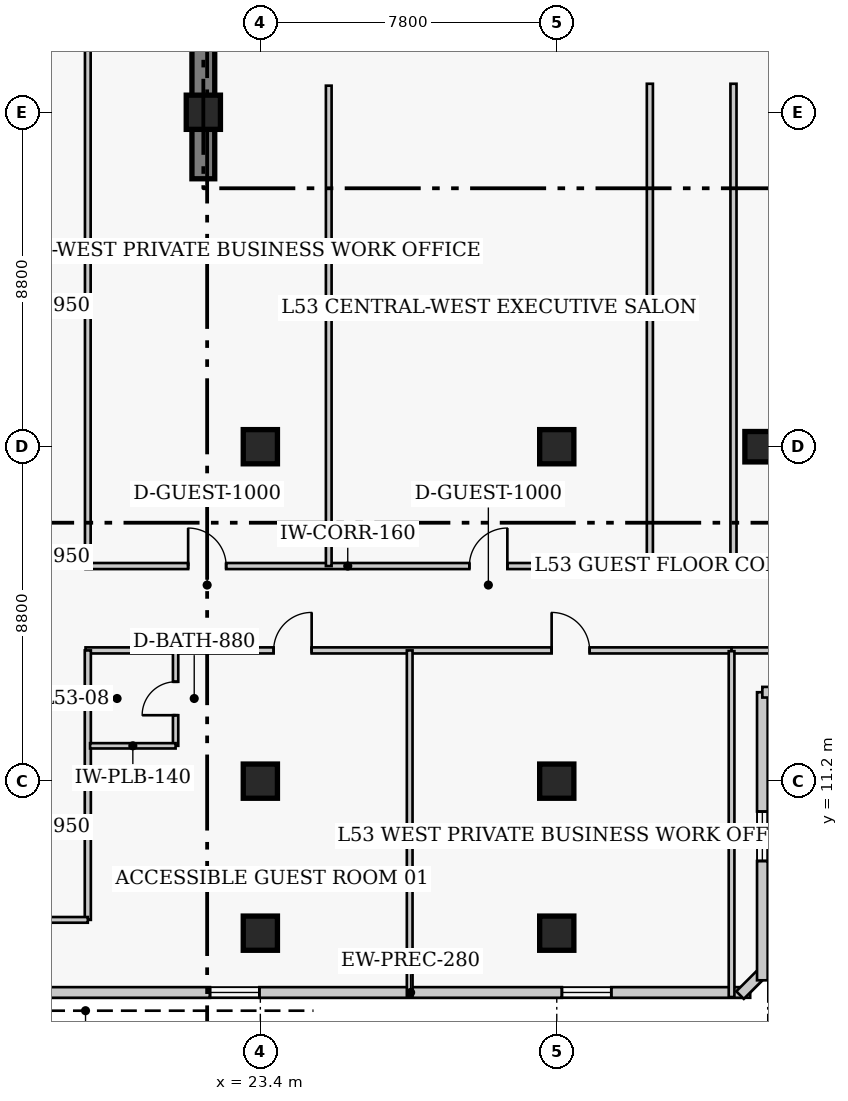
"""IFC4 building model, lengths in metres.
Left out: names, types, materials, properties, quantities, classifications, styles, units other than length and angle.
Written with IfcOpenShell. Run it as: python <this file> out.ifc"""

import sys

from ifc_helpers import new_model, si_unit, direction, frame, frame_2d, origin, origin_2d, place, context, subcontext, project, spatial, rectangle, extrude, element, fill, save


model = new_model("IFC4")
c1 = context("Model", 3, precision=1e-05, world=origin(), true_north=direction((0.0, 1.0)))
c2 = subcontext(c1, "Body", "Model", "MODEL_VIEW")
j1 = project(units=[si_unit("LENGTHUNIT", "METRE"), si_unit("PLANEANGLEUNIT", "RADIAN")], contexts=[c1])
p1 = place(None, origin())
s1 = spatial("IfcSite", under=j1, at=p1, CompositionType="ELEMENT")
p2 = place(p1, origin())
s2 = spatial("IfcBuilding", under=s1, at=p2, CompositionType="ELEMENT")
p3 = place(p2, frame((0.0, 0.0, 212.4)))
s3 = spatial("IfcBuildingStorey", under=s2, at=p3, CompositionType="ELEMENT", Elevation=212.4)
p4 = place(p3, frame((21.9, 27.05, 0.0), z_axis=(0.0, 0.0, 1.0), x_axis=(0.0, 1.0, 0.0)))
e1 = element("IfcWall", 1, at=p4, inside=s3, PredefinedType="SHEAR", context=c2, shape_type="SweptSolid", body=[
    extrude(rectangle(XDim=13.57, YDim=0.6, at=frame_2d((6.785, 0.0))), origin(), (0.0, 0.0, 1.0), 3.9),
])
for number, where, z_axis, x_axis in (
    (2, (23.4, 11.2, 0.0), (0.0, 0.0, 1.0), (1.0, 0.0, 0.0)),
    (3, (23.4, 20.0, 0.0), (0.0, 0.0, 1.0), (1.0, 0.0, 0.0)),
    (4, (31.2, 11.2, 0.0), (0.0, 0.0, 1.0), (1.0, 0.0, 0.0)),
    (5, (31.2, 20.0, 0.0), (0.0, 0.0, 1.0), (1.0, 0.0, 0.0)),
):
    element("IfcColumn", number, at=place(p3, frame(where, z_axis=z_axis, x_axis=x_axis)), inside=s3, PredefinedType="COLUMN", context=c2, shape_type="SweptSolid", body=[
        extrude(rectangle(XDim=0.9, YDim=0.9, at=origin_2d()), origin(), (0.0, 0.0, 1.0), 3.9),
    ])
p5 = place(p3, frame((36.75, 20.0, 0.0), z_axis=(0.0, 0.0, 1.0), x_axis=(1.0, 0.0, 0.0)))
e6 = element("IfcColumn", 6, at=p5, inside=s3, PredefinedType="COLUMN", context=c2, shape_type="SweptSolid", body=[
    extrude(rectangle(XDim=1.2, YDim=0.8, at=origin_2d()), origin(), (0.0, 0.0, 1.0), 3.9),
])
for number, where, z_axis, x_axis in (
    (7, (21.9, 28.8, 0.0), (0.0, 0.0, 1.0), (1.0, 0.0, 0.0)),
    (8, (23.4, 7.2, 0.0), (0.0, 0.0, 1.0), (1.0, 0.0, 0.0)),
    (9, (31.2, 7.2, 0.0), (0.0, 0.0, 1.0), (1.0, 0.0, 0.0)),
):
    element("IfcColumn", number, at=place(p3, frame(where, z_axis=z_axis, x_axis=x_axis)), inside=s3, PredefinedType="COLUMN", context=c2, shape_type="SweptSolid", body=[
        extrude(rectangle(XDim=0.9, YDim=0.9, at=origin_2d()), origin(), (0.0, 0.0, 1.0), 3.9),
    ])
p6 = place(p3, frame((10.46, 5.64, 0.0), z_axis=(0.0, 0.0, 1.0), x_axis=(1.0, 0.0, 0.0)))
e10 = element("IfcWall", 10, at=p6, inside=s3, PredefinedType="SOLIDWALL", context=c2, shape_type="SweptSolid", body=[
    extrude(rectangle(XDim=25.83, YDim=0.28, at=frame_2d((12.915, 0.0))), origin(), (0.0, 0.0, 1.0), 3.65),
])
p7 = place(p6, frame((4.305, 0.0, 0.85)))
e11 = element("IfcOpeningElement", 11, at=p7, cuts=e10, PredefinedType="OPENING", context=c2, shape_type="SweptSolid", body=[
    extrude(rectangle(XDim=1.3, YDim=1.7, at=frame_2d((0.65, 0.85))), frame((0.0, 0.15, 0.0), z_axis=(0.0, -1.0, 0.0), x_axis=(1.0, 0.0, 0.0)), (0.0, 0.0, 1.0), 0.3),
])
p8 = place(p6, frame((11.615, 0.0, 0.85)))
e12 = element("IfcOpeningElement", 12, at=p8, cuts=e10, PredefinedType="OPENING", context=c2, shape_type="SweptSolid", body=[
    extrude(rectangle(XDim=1.3, YDim=1.7, at=frame_2d((0.65, 0.85))), frame((0.0, 0.15, 0.0), z_axis=(0.0, -1.0, 0.0), x_axis=(1.0, 0.0, 0.0)), (0.0, 0.0, 1.0), 0.3),
])
p9 = place(p6, frame((20.875, 0.0, 0.85)))
e13 = element("IfcOpeningElement", 13, at=p9, cuts=e10, PredefinedType="OPENING", context=c2, shape_type="SweptSolid", body=[
    extrude(rectangle(XDim=1.3, YDim=1.7, at=frame_2d((0.65, 0.85))), frame((0.0, 0.15, 0.0), z_axis=(0.0, -1.0, 0.0), x_axis=(1.0, 0.0, 0.0)), (0.0, 0.0, 1.0), 0.3),
])
p10 = place(p3, frame((36.023, 5.571, 0.0), z_axis=(0.0, 0.0, 1.0), x_axis=(0.707106781187, 0.707106781187, 0.0)))
e14 = element("IfcWall", 14, at=p10, inside=s3, PredefinedType="SOLIDWALL", context=c2, shape_type="SweptSolid", body=[
    extrude(rectangle(XDim=0.928, YDim=0.28, at=frame_2d((0.464, 0.0))), origin(), (0.0, 0.0, 1.0), 3.65),
])
p11 = place(p3, frame((36.61, 5.96, 0.0), z_axis=(0.0, 0.0, 1.0), x_axis=(0.0, 1.0, 0.0)))
e15 = element("IfcWall", 15, at=p11, inside=s3, PredefinedType="SOLIDWALL", context=c2, shape_type="SweptSolid", body=[
    extrude(rectangle(XDim=7.58, YDim=0.28, at=frame_2d((3.79, 0.0))), origin(), (0.0, 0.0, 1.0), 3.65),
])
p12 = place(p11, frame((3.14, 0.0, 0.85)))
e16 = element("IfcOpeningElement", 16, at=p12, cuts=e15, PredefinedType="OPENING", context=c2, shape_type="SweptSolid", body=[
    extrude(rectangle(XDim=1.3, YDim=1.7, at=frame_2d((0.65, 0.85))), frame((0.0, 0.15, 0.0), z_axis=(0.0, -1.0, 0.0), x_axis=(1.0, 0.0, 0.0)), (0.0, 0.0, 1.0), 0.3),
])
p13 = place(p3, frame((36.61, 13.54, 0.0), z_axis=(0.0, 0.0, 1.0), x_axis=(1.0, 0.0, 0.0)))
e17 = element("IfcWall", 17, at=p13, inside=s3, PredefinedType="SOLIDWALL", context=c2, shape_type="SweptSolid", body=[
    extrude(rectangle(XDim=4.78, YDim=0.28, at=frame_2d((2.39, 0.0))), origin(), (0.0, 0.0, 1.0), 3.65),
])
p14 = place(p13, frame((1.74, 0.0, 0.85)))
e18 = element("IfcOpeningElement", 18, at=p14, cuts=e17, PredefinedType="OPENING", context=c2, shape_type="SweptSolid", body=[
    extrude(rectangle(XDim=1.3, YDim=1.7, at=frame_2d((0.65, 0.85))), frame((0.0, 0.15, 0.0), z_axis=(0.0, -1.0, 0.0), x_axis=(1.0, 0.0, 0.0)), (0.0, 0.0, 1.0), 0.3),
])
p15 = place(p3, frame((18.8, 16.86, 0.0), z_axis=(0.0, 0.0, 1.0), x_axis=(1.0, 0.0, 0.0)))
e19 = element("IfcWall", 19, at=p15, inside=s3, PredefinedType="PARTITIONING", context=c2, shape_type="SweptSolid", body=[
    extrude(rectangle(XDim=14.85, YDim=0.16, at=frame_2d((7.425, 0.0))), origin(), (0.0, 0.0, 1.0), 3.65),
])
p16 = place(p15, frame((2.7, 0.0, 0.0)))
e20 = element("IfcOpeningElement", 20, at=p16, cuts=e19, PredefinedType="OPENING", context=c2, shape_type="SweptSolid", body=[
    extrude(rectangle(XDim=1.0, YDim=2.15, at=frame_2d((0.5, 1.075))), frame((0.0, 0.09, 0.0), z_axis=(0.0, -1.0, 0.0), x_axis=(1.0, 0.0, 0.0)), (0.0, 0.0, 1.0), 0.18),
])
p17 = place(p15, frame((10.1, 0.0, 0.0)))
e21 = element("IfcOpeningElement", 21, at=p17, cuts=e19, PredefinedType="OPENING", context=c2, shape_type="SweptSolid", body=[
    extrude(rectangle(XDim=1.0, YDim=2.15, at=frame_2d((0.5, 1.075))), frame((0.0, 0.09, 0.0), z_axis=(0.0, -1.0, 0.0), x_axis=(1.0, 0.0, 0.0)), (0.0, 0.0, 1.0), 0.18),
])
p18 = place(p3, frame((35.85, 16.86, 0.0), z_axis=(0.0, 0.0, 1.0), x_axis=(1.0, 0.0, 0.0)))
e22 = element("IfcWall", 22, at=p18, inside=s3, PredefinedType="PARTITIONING", context=c2, shape_type="SweptSolid", body=[
    extrude(rectangle(XDim=22.8, YDim=0.16, at=frame_2d((11.4, 0.0))), origin(), (0.0, 0.0, 1.0), 3.65),
])
p19 = place(p18, frame((9.65, 0.0, 0.0)))
e23 = element("IfcOpeningElement", 23, at=p19, cuts=e22, PredefinedType="OPENING", context=c2, shape_type="SweptSolid", body=[
    extrude(rectangle(XDim=1.0, YDim=2.15, at=frame_2d((0.5, 1.075))), frame((0.0, 0.09, 0.0), z_axis=(0.0, -1.0, 0.0), x_axis=(1.0, 0.0, 0.0)), (0.0, 0.0, 1.0), 0.18),
])
p20 = place(p18, frame((18.05, 0.0, 0.0)))
e24 = element("IfcOpeningElement", 24, at=p20, cuts=e22, PredefinedType="OPENING", context=c2, shape_type="SweptSolid", body=[
    extrude(rectangle(XDim=1.0, YDim=2.15, at=frame_2d((0.5, 1.075))), frame((0.0, 0.09, 0.0), z_axis=(0.0, -1.0, 0.0), x_axis=(1.0, 0.0, 0.0)), (0.0, 0.0, 1.0), 0.18),
])
for number, where, z_axis, x_axis in (
    (25, (33.65, 16.86, 0.0), (0.0, 0.0, 1.0), (0.0, 1.0, 0.0)),
    (26, (35.85, 16.86, 0.0), (0.0, 0.0, 1.0), (0.0, 1.0, 0.0)),
):
    element("IfcWall", number, at=place(p3, frame(where, z_axis=z_axis, x_axis=x_axis)), inside=s3, PredefinedType="PARTITIONING", context=c2, shape_type="SweptSolid", body=[
        extrude(rectangle(XDim=12.69, YDim=0.16, at=frame_2d((6.345, 0.0))), origin(), (0.0, 0.0, 1.0), 3.65),
    ])
p21 = place(p3, frame((18.8, 14.64, 0.0), z_axis=(0.0, 0.0, 1.0), x_axis=(1.0, 0.0, 0.0)))
e27 = element("IfcWall", 27, at=p21, inside=s3, PredefinedType="PARTITIONING", context=c2, shape_type="SweptSolid", body=[
    extrude(rectangle(XDim=17.0, YDim=0.16, at=frame_2d((8.5, 0.0))), origin(), (0.0, 0.0, 1.0), 3.65),
])
p22 = place(p21, frame((4.95, 0.0, 0.0)))
e28 = element("IfcOpeningElement", 28, at=p22, cuts=e27, PredefinedType="OPENING", context=c2, shape_type="SweptSolid", body=[
    extrude(rectangle(XDim=1.0, YDim=2.15, at=frame_2d((0.5, 1.075))), frame((0.0, 0.09, 0.0), z_axis=(0.0, -1.0, 0.0), x_axis=(1.0, 0.0, 0.0)), (0.0, 0.0, 1.0), 0.18),
])
p23 = place(p21, frame((12.265, 0.0, 0.0)))
e29 = element("IfcOpeningElement", 29, at=p23, cuts=e27, PredefinedType="OPENING", context=c2, shape_type="SweptSolid", body=[
    extrude(rectangle(XDim=1.0, YDim=2.15, at=frame_2d((0.5, 1.075))), frame((0.0, 0.09, 0.0), z_axis=(0.0, -1.0, 0.0), x_axis=(1.0, 0.0, 0.0)), (0.0, 0.0, 1.0), 0.18),
])
p24 = place(p3, frame((35.8, 14.64, 0.0), z_axis=(0.0, 0.0, 1.0), x_axis=(1.0, 0.0, 0.0)))
e30 = element("IfcWall", 30, at=p24, inside=s3, PredefinedType="PARTITIONING", context=c2, shape_type="SweptSolid", body=[
    extrude(rectangle(XDim=22.85, YDim=0.16, at=frame_2d((11.425, 0.0))), origin(), (0.0, 0.0, 1.0), 3.65),
])
p25 = place(p24, frame((5.748, 0.0, 0.0)))
e31 = element("IfcOpeningElement", 31, at=p25, cuts=e30, PredefinedType="OPENING", context=c2, shape_type="SweptSolid", body=[
    extrude(rectangle(XDim=1.0, YDim=2.15, at=frame_2d((0.5, 1.075))), frame((0.0, 0.09, 0.0), z_axis=(0.0, -1.0, 0.0), x_axis=(1.0, 0.0, 0.0)), (0.0, 0.0, 1.0), 0.18),
])
p26 = place(p3, frame((18.86, 7.55, 0.0), z_axis=(0.0, 0.0, 1.0), x_axis=(0.0, 1.0, 0.0)))
e32 = element("IfcWall", 32, at=p26, inside=s3, PredefinedType="PARTITIONING", context=c2, shape_type="SweptSolid", body=[
    extrude(rectangle(XDim=7.09, YDim=0.16, at=frame_2d((3.545, 0.0))), origin(), (0.0, 0.0, 1.0), 3.65),
])
p27 = place(p3, frame((16.64, 7.55, 0.0), z_axis=(0.0, 0.0, 1.0), x_axis=(1.0, 0.0, 0.0)))
e33 = element("IfcWall", 33, at=p27, inside=s3, PredefinedType="PARTITIONING", context=c2, shape_type="SweptSolid", body=[
    extrude(rectangle(XDim=2.22, YDim=0.15, at=frame_2d((1.11, 0.0))), origin(), (0.0, 0.0, 1.0), 3.65),
])
p28 = place(p3, frame((18.86, 16.86, 0.0), z_axis=(0.0, 0.0, 1.0), x_axis=(0.0, 1.0, 0.0)))
e34 = element("IfcWall", 34, at=p28, inside=s3, PredefinedType="PARTITIONING", context=c2, shape_type="SweptSolid", body=[
    extrude(rectangle(XDim=15.94, YDim=0.15, at=frame_2d((7.97, 0.0))), origin(), (0.0, 0.0, 1.0), 3.65),
])
p29 = place(p3, frame((25.2, 16.86, 0.0), z_axis=(0.0, 0.0, 1.0), x_axis=(0.0, 1.0, 0.0)))
e35 = element("IfcWall", 35, at=p29, inside=s3, PredefinedType="PARTITIONING", context=c2, shape_type="SweptSolid", body=[
    extrude(rectangle(XDim=12.64, YDim=0.15, at=frame_2d((6.32, 0.0))), origin(), (0.0, 0.0, 1.0), 3.65),
])
p30 = place(p3, frame((21.17, 12.13, 0.0), z_axis=(0.0, 0.0, 1.0), x_axis=(0.0, 1.0, 0.0)))
e36 = element("IfcWall", 36, at=p30, inside=s3, PredefinedType="PLUMBINGWALL", context=c2, shape_type="SweptSolid", body=[
    extrude(rectangle(XDim=2.49, YDim=0.14, at=frame_2d((1.245, 0.0))), origin(), (0.0, 0.0, 1.0), 3.65),
])
p31 = place(p30, frame((0.805, 0.0, 0.0)))
e37 = element("IfcOpeningElement", 37, at=p31, cuts=e36, PredefinedType="OPENING", context=c2, shape_type="SweptSolid", body=[
    extrude(rectangle(XDim=0.88, YDim=2.05, at=frame_2d((0.44, 1.025))), frame((0.0, 0.08, 0.0), z_axis=(0.0, -1.0, 0.0), x_axis=(1.0, 0.0, 0.0)), (0.0, 0.0, 1.0), 0.16),
])
p32 = place(p3, frame((18.92, 12.13, 0.0), z_axis=(0.0, 0.0, 1.0), x_axis=(1.0, 0.0, 0.0)))
e38 = element("IfcWall", 38, at=p32, inside=s3, PredefinedType="PLUMBINGWALL", context=c2, shape_type="SweptSolid", body=[
    extrude(rectangle(XDim=2.25, YDim=0.14, at=frame_2d((1.125, 0.0))), origin(), (0.0, 0.0, 1.0), 3.65),
])
p33 = place(p3, frame((27.33, 5.52, 0.0), z_axis=(0.0, 0.0, 1.0), x_axis=(0.0, 1.0, 0.0)))
e39 = element("IfcWall", 39, at=p33, inside=s3, PredefinedType="PARTITIONING", context=c2, shape_type="SweptSolid", body=[
    extrude(rectangle(XDim=9.12, YDim=0.15, at=frame_2d((4.56, 0.0))), origin(), (0.0, 0.0, 1.0), 3.246),
])
p34 = place(p3, frame((35.8, 5.52, 0.0), z_axis=(0.0, 0.0, 1.0), x_axis=(0.0, 1.0, 0.0)))
e40 = element("IfcWall", 40, at=p34, inside=s3, PredefinedType="PARTITIONING", context=c2, shape_type="SweptSolid", body=[
    extrude(rectangle(XDim=9.1, YDim=0.15, at=frame_2d((4.55, 0.0))), origin(), (0.0, 0.0, 1.0), 3.65),
])
p35 = place(p8, origin())
e41 = element("IfcWindow", 41, at=p35, inside=s3, PartitioningType="SINGLE_PANEL", PredefinedType="WINDOW", context=c2, shape_type="SweptSolid", body=[
    extrude(rectangle(XDim=1.3, YDim=1.7, at=frame_2d((0.65, 0.85))), frame((0.0, 0.03, 0.0), z_axis=(0.0, -1.0, 0.0), x_axis=(1.0, 0.0, 0.0)), (0.0, 0.0, 1.0), 0.06),
])
fill(e12, e41)
p36 = place(p9, origin())
e42 = element("IfcWindow", 42, at=p36, inside=s3, PartitioningType="SINGLE_PANEL", PredefinedType="WINDOW", context=c2, shape_type="SweptSolid", body=[
    extrude(rectangle(XDim=1.3, YDim=1.7, at=frame_2d((0.65, 0.85))), frame((0.0, 0.03, 0.0), z_axis=(0.0, -1.0, 0.0), x_axis=(1.0, 0.0, 0.0)), (0.0, 0.0, 1.0), 0.06),
])
fill(e13, e42)
p37 = place(p12, origin())
e43 = element("IfcWindow", 43, at=p37, inside=s3, PartitioningType="SINGLE_PANEL", PredefinedType="WINDOW", context=c2, shape_type="SweptSolid", body=[
    extrude(rectangle(XDim=1.3, YDim=1.7, at=frame_2d((0.65, 0.85))), frame((0.0, 0.03, 0.0), z_axis=(0.0, -1.0, 0.0), x_axis=(1.0, 0.0, 0.0)), (0.0, 0.0, 1.0), 0.06),
])
fill(e16, e43)
p38 = place(p16, origin())
e44 = element("IfcDoor", 44, at=p38, inside=s3, OperationType="SINGLE_SWING_LEFT", PredefinedType="DOOR", context=c2, shape_type="SweptSolid", body=[
    extrude(rectangle(XDim=1.0, YDim=2.15, at=frame_2d((0.5, 1.075))), frame((0.0, 0.025, 0.0), z_axis=(0.0, -1.0, 0.0), x_axis=(1.0, 0.0, 0.0)), (0.0, 0.0, 1.0), 0.05),
])
fill(e20, e44)
p39 = place(p17, origin())
e45 = element("IfcDoor", 45, at=p39, inside=s3, OperationType="SINGLE_SWING_RIGHT", PredefinedType="DOOR", context=c2, shape_type="SweptSolid", body=[
    extrude(rectangle(XDim=1.0, YDim=2.15, at=frame_2d((0.5, 1.075))), frame((0.0, 0.025, 0.0), z_axis=(0.0, -1.0, 0.0), x_axis=(1.0, 0.0, 0.0)), (0.0, 0.0, 1.0), 0.05),
])
fill(e21, e45)
p40 = place(p31, origin())
e46 = element("IfcDoor", 46, at=p40, inside=s3, OperationType="SINGLE_SWING_LEFT", PredefinedType="DOOR", context=c2, shape_type="SweptSolid", body=[
    extrude(rectangle(XDim=0.88, YDim=2.05, at=frame_2d((0.44, 1.025))), frame((0.0, 0.025, 0.0), z_axis=(0.0, -1.0, 0.0), x_axis=(1.0, 0.0, 0.0)), (0.0, 0.0, 1.0), 0.05),
])
fill(e37, e46)
p41 = place(p22, origin())
e47 = element("IfcDoor", 47, at=p41, inside=s3, OperationType="SINGLE_SWING_RIGHT", PredefinedType="DOOR", context=c2, shape_type="SweptSolid", body=[
    extrude(rectangle(XDim=1.0, YDim=2.15, at=frame_2d((0.5, 1.075))), frame((0.0, 0.025, 0.0), z_axis=(0.0, -1.0, 0.0), x_axis=(1.0, 0.0, 0.0)), (0.0, 0.0, 1.0), 0.05),
])
fill(e28, e47)
p42 = place(p23, origin())
e48 = element("IfcDoor", 48, at=p42, inside=s3, OperationType="SINGLE_SWING_LEFT", PredefinedType="DOOR", context=c2, shape_type="SweptSolid", body=[
    extrude(rectangle(XDim=1.0, YDim=2.15, at=frame_2d((0.5, 1.075))), frame((0.0, 0.025, 0.0), z_axis=(0.0, -1.0, 0.0), x_axis=(1.0, 0.0, 0.0)), (0.0, 0.0, 1.0), 0.05),
])
fill(e29, e48)
save(model, sys.argv[1])
